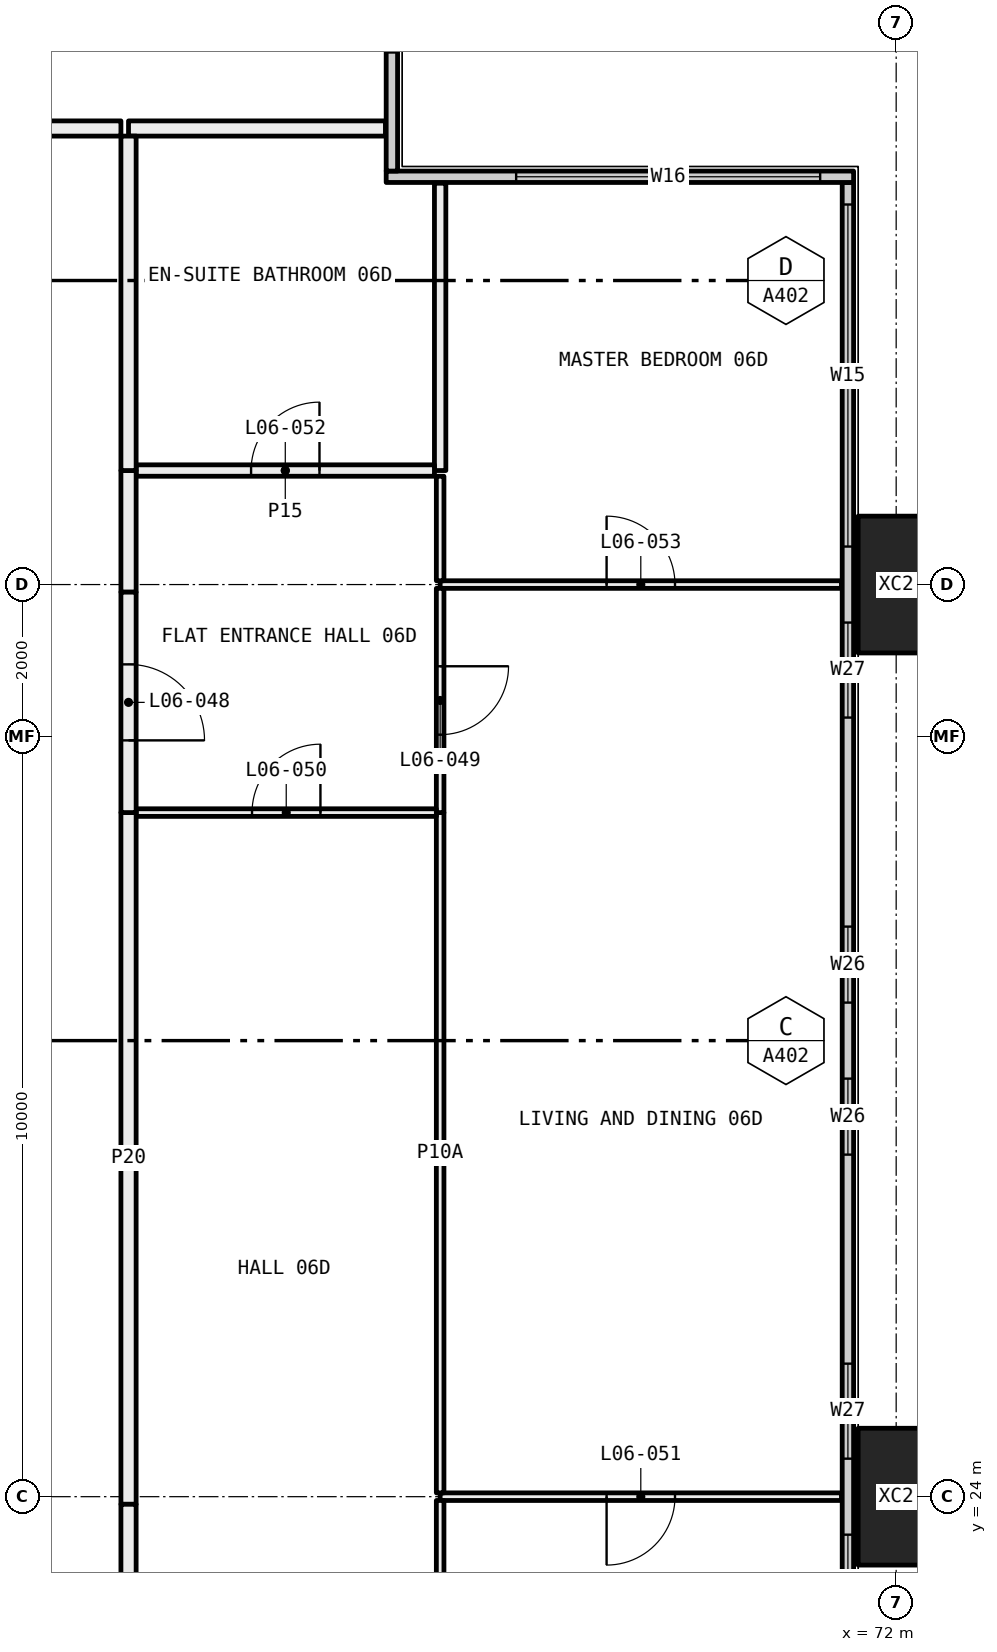
"""IFC4 building model, lengths in metres.
Left out: names, types, materials, properties, quantities, classifications, styles, units other than length and angle.
Written with IfcOpenShell. Run it as: python <this file> out.ifc"""

import sys

from ifc_helpers import new_model, si_unit, direction, frame, frame_2d, origin, origin_2d, place, context, subcontext, project, spatial, rectangle, hollow_rectangle, extrude, element, fill, save


model = new_model("IFC4")
c1 = context("Model", 3, precision=1e-05, world=origin(), true_north=direction((0.0, 1.0)))
c2 = subcontext(c1, "Body", "Model", "MODEL_VIEW")
j1 = project(units=[si_unit("LENGTHUNIT", "METRE"), si_unit("PLANEANGLEUNIT", "RADIAN")], contexts=[c1])
p1 = place(None, origin())
s1 = spatial("IfcSite", under=j1, at=p1, CompositionType="ELEMENT")
p2 = place(p1, origin())
s2 = spatial("IfcBuilding", under=s1, at=p2, CompositionType="ELEMENT")
p3 = place(p2, frame((0.0, 0.0, 33.45)))
s3 = spatial("IfcBuildingStorey", under=s2, at=p3, CompositionType="ELEMENT", Elevation=33.45)
for number, where, z_axis, x_axis in (
    (1, (72.0, 24.0, -0.4), (0.0, 0.0, 1.0), (0.0, 1.0, 0.0)),
    (2, (72.0, 36.0, -0.4), (0.0, 0.0, 1.0), (0.0, 1.0, 0.0)),
):
    element("IfcColumn", number, at=place(p3, frame(where, z_axis=z_axis, x_axis=x_axis)), inside=s3, PredefinedType="COLUMN", context=c2, shape_type="SweptSolid", body=[
        extrude(hollow_rectangle(XDim=1.8, YDim=1.0, WallThickness=0.07, at=origin_2d()), origin(), (0.0, 0.0, 1.0), 3.45),
    ])
p4 = place(p3, frame((71.365, 6.71, 0.0), z_axis=(0.0, 0.0, 1.0), x_axis=(0.0, 1.0, 0.0)))
e3 = element("IfcWall", 3, at=p4, inside=s3, PredefinedType="ELEMENTEDWALL", context=c2, shape_type="SweptSolid", body=[
    extrude(rectangle(XDim=34.58, YDim=0.15, at=frame_2d((17.29, 0.0))), origin(), (0.0, 0.0, 1.0), 3.05),
])
p5 = place(p4, frame((0.29, 0.0, 0.45)))
e4 = element("IfcOpeningElement", 4, at=p5, cuts=e3, PredefinedType="OPENING", context=c2, shape_type="SweptSolid", body=[
    extrude(rectangle(XDim=4.5, YDim=2.55, at=frame_2d((2.25, 1.275))), frame((0.0, 0.085, 0.0), z_axis=(0.0, -1.0, 0.0), x_axis=(1.0, 0.0, 0.0)), (0.0, 0.0, 1.0), 0.17),
])
p6 = place(p4, frame((5.79, 0.0, 0.45)))
e5 = element("IfcOpeningElement", 5, at=p6, cuts=e3, PredefinedType="OPENING", context=c2, shape_type="SweptSolid", body=[
    extrude(rectangle(XDim=1.25, YDim=2.55, at=frame_2d((0.625, 1.275))), frame((0.0, 0.085, 0.0), z_axis=(0.0, -1.0, 0.0), x_axis=(1.0, 0.0, 0.0)), (0.0, 0.0, 1.0), 0.17),
])
p7 = place(p4, frame((9.79, 0.0, 0.45)))
e6 = element("IfcOpeningElement", 6, at=p7, cuts=e3, PredefinedType="OPENING", context=c2, shape_type="SweptSolid", body=[
    extrude(rectangle(XDim=1.0, YDim=2.55, at=frame_2d((0.5, 1.275))), frame((0.0, 0.085, 0.0), z_axis=(0.0, -1.0, 0.0), x_axis=(1.0, 0.0, 0.0)), (0.0, 0.0, 1.0), 0.17),
])
p8 = place(p4, frame((11.79, 0.0, 0.45)))
e7 = element("IfcOpeningElement", 7, at=p8, cuts=e3, PredefinedType="OPENING", context=c2, shape_type="SweptSolid", body=[
    extrude(rectangle(XDim=1.0, YDim=2.55, at=frame_2d((0.5, 1.275))), frame((0.0, 0.085, 0.0), z_axis=(0.0, -1.0, 0.0), x_axis=(1.0, 0.0, 0.0)), (0.0, 0.0, 1.0), 0.17),
])
p9 = place(p4, frame((15.54, 0.0, 0.45)))
e8 = element("IfcOpeningElement", 8, at=p9, cuts=e3, PredefinedType="OPENING", context=c2, shape_type="SweptSolid", body=[
    extrude(rectangle(XDim=1.25, YDim=2.55, at=frame_2d((0.625, 1.275))), frame((0.0, 0.085, 0.0), z_axis=(0.0, -1.0, 0.0), x_axis=(1.0, 0.0, 0.0)), (0.0, 0.0, 1.0), 0.17),
])
p10 = place(p4, frame((17.79, 0.0, 0.45)))
e9 = element("IfcOpeningElement", 9, at=p10, cuts=e3, PredefinedType="OPENING", context=c2, shape_type="SweptSolid", body=[
    extrude(rectangle(XDim=1.25, YDim=2.55, at=frame_2d((0.625, 1.275))), frame((0.0, 0.085, 0.0), z_axis=(0.0, -1.0, 0.0), x_axis=(1.0, 0.0, 0.0)), (0.0, 0.0, 1.0), 0.17),
])
p11 = place(p4, frame((21.79, 0.0, 0.45)))
e10 = element("IfcOpeningElement", 10, at=p11, cuts=e3, PredefinedType="OPENING", context=c2, shape_type="SweptSolid", body=[
    extrude(rectangle(XDim=1.0, YDim=2.55, at=frame_2d((0.5, 1.275))), frame((0.0, 0.085, 0.0), z_axis=(0.0, -1.0, 0.0), x_axis=(1.0, 0.0, 0.0)), (0.0, 0.0, 1.0), 0.17),
])
p12 = place(p4, frame((23.79, 0.0, 0.45)))
e11 = element("IfcOpeningElement", 11, at=p12, cuts=e3, PredefinedType="OPENING", context=c2, shape_type="SweptSolid", body=[
    extrude(rectangle(XDim=1.0, YDim=2.55, at=frame_2d((0.5, 1.275))), frame((0.0, 0.085, 0.0), z_axis=(0.0, -1.0, 0.0), x_axis=(1.0, 0.0, 0.0)), (0.0, 0.0, 1.0), 0.17),
])
p13 = place(p4, frame((27.54, 0.0, 0.45)))
e12 = element("IfcOpeningElement", 12, at=p13, cuts=e3, PredefinedType="OPENING", context=c2, shape_type="SweptSolid", body=[
    extrude(rectangle(XDim=1.25, YDim=2.55, at=frame_2d((0.625, 1.275))), frame((0.0, 0.085, 0.0), z_axis=(0.0, -1.0, 0.0), x_axis=(1.0, 0.0, 0.0)), (0.0, 0.0, 1.0), 0.17),
])
p14 = place(p4, frame((29.79, 0.0, 0.45)))
e13 = element("IfcOpeningElement", 13, at=p14, cuts=e3, PredefinedType="OPENING", context=c2, shape_type="SweptSolid", body=[
    extrude(rectangle(XDim=4.5, YDim=2.55, at=frame_2d((2.25, 1.275))), frame((0.0, 0.085, 0.0), z_axis=(0.0, -1.0, 0.0), x_axis=(1.0, 0.0, 0.0)), (0.0, 0.0, 1.0), 0.17),
])
p15 = place(p3, frame((65.29, 41.365, 0.0), z_axis=(0.0, 0.0, 1.0), x_axis=(1.0, 0.0, 0.0)))
e14 = element("IfcWall", 14, at=p15, inside=s3, PredefinedType="ELEMENTEDWALL", context=c2, shape_type="SweptSolid", body=[
    extrude(rectangle(XDim=6.15, YDim=0.15, at=frame_2d((3.075, 0.0))), origin(), (0.0, 0.0, 1.0), 3.05),
])
p16 = place(p15, frame((1.71, 0.0, 0.45)))
e15 = element("IfcOpeningElement", 15, at=p16, cuts=e14, PredefinedType="OPENING", context=c2, shape_type="SweptSolid", body=[
    extrude(rectangle(XDim=4.0, YDim=2.55, at=frame_2d((2.0, 1.275))), frame((0.0, 0.085, 0.0), z_axis=(0.0, -1.0, 0.0), x_axis=(1.0, 0.0, 0.0)), (0.0, 0.0, 1.0), 0.17),
])
p17 = place(p3, frame((65.365, 41.44, 0.0), z_axis=(0.0, 0.0, 1.0), x_axis=(0.0, 1.0, 0.0)))
e16 = element("IfcWall", 16, at=p17, inside=s3, PredefinedType="ELEMENTEDWALL", context=c2, shape_type="SweptSolid", body=[
    extrude(rectangle(XDim=5.85, YDim=0.15, at=frame_2d((2.925, 0.0))), origin(), (0.0, 0.0, 1.0), 3.05),
])
p18 = place(p17, frame((1.56, 0.0, 0.45)))
e17 = element("IfcOpeningElement", 17, at=p18, cuts=e16, PredefinedType="OPENING", context=c2, shape_type="SweptSolid", body=[
    extrude(rectangle(XDim=4.0, YDim=2.55, at=frame_2d((2.0, 1.275))), frame((0.0, 0.085, 0.0), z_axis=(0.0, -1.0, 0.0), x_axis=(1.0, 0.0, 0.0)), (0.0, 0.0, 1.0), 0.17),
])
p19 = place(p3, frame((71.28, 24.0, 0.0), z_axis=(0.0, 0.0, 1.0), x_axis=(-1.0, 0.0, 0.0)))
e18 = element("IfcWall", 18, at=p19, inside=s3, PredefinedType="PARTITIONING", context=c2, shape_type="SweptSolid", body=[
    extrude(rectangle(XDim=5.28, YDim=0.1, at=frame_2d((2.64, 0.0))), origin(), (0.0, 0.0, 1.0), 2.45),
])
p20 = place(p19, frame((2.19, 0.0, 0.0)))
e19 = element("IfcOpeningElement", 19, at=p20, cuts=e18, PredefinedType="OPENING", context=c2, shape_type="SweptSolid", body=[
    extrude(rectangle(XDim=0.9, YDim=2.1, at=frame_2d((0.45, 1.05))), frame((0.0, 0.06, 0.0), z_axis=(0.0, -1.0, 0.0), x_axis=(1.0, 0.0, 0.0)), (0.0, 0.0, 1.0), 0.12),
])
p21 = place(p3, frame((66.0, 23.95, 0.0), z_axis=(0.0, 0.0, 1.0), x_axis=(0.0, -1.0, 0.0)))
e20 = element("IfcWall", 20, at=p21, inside=s3, PredefinedType="PARTITIONING", context=c2, shape_type="SweptSolid", body=[
    extrude(rectangle(XDim=2.875, YDim=0.1, at=frame_2d((1.438, 0.0))), origin(), (0.0, 0.0, 1.0), 2.45),
])
p22 = place(p3, frame((71.28, 36.0, 0.0), z_axis=(0.0, 0.0, 1.0), x_axis=(-1.0, 0.0, 0.0)))
e21 = element("IfcWall", 21, at=p22, inside=s3, PredefinedType="PARTITIONING", context=c2, shape_type="SweptSolid", body=[
    extrude(rectangle(XDim=5.28, YDim=0.1, at=frame_2d((2.64, 0.0))), origin(), (0.0, 0.0, 1.0), 2.45),
])
p23 = place(p22, frame((2.19, 0.0, 0.0)))
e22 = element("IfcOpeningElement", 22, at=p23, cuts=e21, PredefinedType="OPENING", context=c2, shape_type="SweptSolid", body=[
    extrude(rectangle(XDim=0.9, YDim=2.1, at=frame_2d((0.45, 1.05))), frame((0.0, 0.06, 0.0), z_axis=(0.0, -1.0, 0.0), x_axis=(1.0, 0.0, 0.0)), (0.0, 0.0, 1.0), 0.12),
])
p24 = place(p3, frame((66.0, 33.0, 0.0), z_axis=(0.0, 0.0, 1.0), x_axis=(0.0, -1.0, 0.0)))
e23 = element("IfcWall", 23, at=p24, inside=s3, PredefinedType="PARTITIONING", context=c2, shape_type="SweptSolid", body=[
    extrude(rectangle(XDim=8.95, YDim=0.1, at=frame_2d((4.475, 0.0))), origin(), (0.0, 0.0, 1.0), 2.45),
])
p25 = place(p3, frame((66.0, 35.95, 0.0), z_axis=(0.0, 0.0, 1.0), x_axis=(0.0, -1.0, 0.0)))
e24 = element("IfcWall", 24, at=p25, inside=s3, PredefinedType="PARTITIONING", context=c2, shape_type="SweptSolid", body=[
    extrude(rectangle(XDim=2.95, YDim=0.1, at=frame_2d((1.475, 0.0))), origin(), (0.0, 0.0, 1.0), 2.45),
])
p26 = place(p25, frame((1.025, 0.0, 0.0)))
e25 = element("IfcOpeningElement", 25, at=p26, cuts=e24, PredefinedType="OPENING", context=c2, shape_type="SweptSolid", body=[
    extrude(rectangle(XDim=0.9, YDim=2.1, at=frame_2d((0.45, 1.05))), frame((0.0, 0.06, 0.0), z_axis=(0.0, -1.0, 0.0), x_axis=(1.0, 0.0, 0.0)), (0.0, 0.0, 1.0), 0.12),
])
p27 = place(p3, frame((66.0, 37.425, 0.0), z_axis=(0.0, 0.0, 1.0), x_axis=(0.0, -1.0, 0.0)))
e26 = element("IfcWall", 26, at=p27, inside=s3, PredefinedType="PARTITIONING", context=c2, shape_type="SweptSolid", body=[
    extrude(rectangle(XDim=1.375, YDim=0.1, at=frame_2d((0.688, 0.0))), origin(), (0.0, 0.0, 1.0), 2.45),
])
p28 = place(p3, frame((66.0, 41.28, 0.0), z_axis=(0.0, 0.0, 1.0), x_axis=(0.0, -1.0, 0.0)))
e27 = element("IfcWall", 27, at=p28, inside=s3, PredefinedType="PARTITIONING", context=c2, shape_type="SweptSolid", body=[
    extrude(rectangle(XDim=3.78, YDim=0.15, at=frame_2d((1.89, 0.0))), origin(), (0.0, 0.0, 1.0), 3.05),
])
p29 = place(p3, frame((65.95, 33.0, 0.0), z_axis=(0.0, 0.0, 1.0), x_axis=(-1.0, 0.0, 0.0)))
e28 = element("IfcWall", 28, at=p29, inside=s3, PredefinedType="PARTITIONING", context=c2, shape_type="SweptSolid", body=[
    extrude(rectangle(XDim=3.95, YDim=0.1, at=frame_2d((1.975, 0.0))), origin(), (0.0, 0.0, 1.0), 3.05),
])
p30 = place(p29, frame((1.525, 0.0, 0.0)))
e29 = element("IfcOpeningElement", 29, at=p30, cuts=e28, PredefinedType="OPENING", context=c2, shape_type="SweptSolid", body=[
    extrude(rectangle(XDim=0.9, YDim=2.1, at=frame_2d((0.45, 1.05))), frame((0.0, 0.06, 0.0), z_axis=(0.0, -1.0, 0.0), x_axis=(1.0, 0.0, 0.0)), (0.0, 0.0, 1.0), 0.12),
])
p31 = place(p3, frame((61.9, 33.0, 0.0), z_axis=(0.0, 0.0, 1.0), x_axis=(0.0, -1.0, 0.0)))
e30 = element("IfcWall", 30, at=p31, inside=s3, PredefinedType="PARTITIONING", context=c2, shape_type="SweptSolid", body=[
    extrude(rectangle(XDim=9.1, YDim=0.2, at=frame_2d((4.55, 0.0))), origin(), (0.0, 0.0, 1.0), 2.45),
])
p32 = place(p3, frame((61.9, 23.9, 0.0), z_axis=(0.0, 0.0, 1.0), x_axis=(0.0, -1.0, 0.0)))
e31 = element("IfcWall", 31, at=p32, inside=s3, PredefinedType="PARTITIONING", context=c2, shape_type="SweptSolid", body=[
    extrude(rectangle(XDim=2.9, YDim=0.2, at=frame_2d((1.45, 0.0))), origin(), (0.0, 0.0, 1.0), 3.05),
])
p33 = place(p3, frame((65.925, 37.5, 0.0), z_axis=(0.0, 0.0, 1.0), x_axis=(-1.0, 0.0, 0.0)))
e32 = element("IfcWall", 32, at=p33, inside=s3, PredefinedType="PARTITIONING", context=c2, shape_type="SweptSolid", body=[
    extrude(rectangle(XDim=3.925, YDim=0.15, at=frame_2d((1.962, 0.0))), origin(), (0.0, 0.0, 1.0), 3.05),
])
p34 = place(p33, frame((1.512, 0.0, 0.0)))
e33 = element("IfcOpeningElement", 33, at=p34, cuts=e32, PredefinedType="OPENING", context=c2, shape_type="SweptSolid", body=[
    extrude(rectangle(XDim=0.9, YDim=2.1, at=frame_2d((0.45, 1.05))), frame((0.0, 0.085, 0.0), z_axis=(0.0, -1.0, 0.0), x_axis=(1.0, 0.0, 0.0)), (0.0, 0.0, 1.0), 0.17),
])
p35 = place(p3, frame((61.9, 37.5, 0.0), z_axis=(0.0, 0.0, 1.0), x_axis=(0.0, -1.0, 0.0)))
e34 = element("IfcWall", 34, at=p35, inside=s3, PredefinedType="PARTITIONING", context=c2, shape_type="SweptSolid", body=[
    extrude(rectangle(XDim=1.6, YDim=0.2, at=frame_2d((0.8, 0.0))), origin(), (0.0, 0.0, 1.0), 2.45),
])
p36 = place(p3, frame((61.9, 35.9, 0.0), z_axis=(0.0, 0.0, 1.0), x_axis=(0.0, -1.0, 0.0)))
e35 = element("IfcWall", 35, at=p36, inside=s3, PredefinedType="PARTITIONING", context=c2, shape_type="SweptSolid", body=[
    extrude(rectangle(XDim=2.9, YDim=0.2, at=frame_2d((1.45, 0.0))), origin(), (0.0, 0.0, 1.0), 3.05),
])
p37 = place(p36, frame((0.95, 0.0, 0.0)))
e36 = element("IfcOpeningElement", 36, at=p37, cuts=e35, PredefinedType="OPENING", context=c2, shape_type="SweptSolid", body=[
    extrude(rectangle(XDim=1.0, YDim=2.1, at=frame_2d((0.5, 1.05))), frame((0.0, 0.11, 0.0), z_axis=(0.0, -1.0, 0.0), x_axis=(1.0, 0.0, 0.0)), (0.0, 0.0, 1.0), 0.22),
])
p38 = place(p3, frame((65.28, 42.0, 0.0), z_axis=(0.0, 0.0, 1.0), x_axis=(-1.0, 0.0, 0.0)))
e37 = element("IfcWall", 37, at=p38, inside=s3, PredefinedType="PARTITIONING", context=c2, shape_type="SweptSolid", body=[
    extrude(rectangle(XDim=3.38, YDim=0.2, at=frame_2d((1.69, 0.0))), origin(), (0.0, 0.0, 1.0), 3.05),
])
p39 = place(p3, frame((61.9, 41.9, 0.0), z_axis=(0.0, 0.0, 1.0), x_axis=(0.0, -1.0, 0.0)))
e38 = element("IfcWall", 38, at=p39, inside=s3, PredefinedType="PARTITIONING", context=c2, shape_type="SweptSolid", body=[
    extrude(rectangle(XDim=4.4, YDim=0.2, at=frame_2d((2.2, 0.0))), origin(), (0.0, 0.0, 1.0), 3.05),
])
p40 = place(p3, frame((60.0, 42.0, 0.0), z_axis=(0.0, 0.0, 1.0), x_axis=(1.0, 0.0, 0.0)))
e39 = element("IfcWall", 39, at=p40, inside=s3, PredefinedType="PARTITIONING", context=c2, shape_type="SweptSolid", body=[
    extrude(rectangle(XDim=1.8, YDim=0.2, at=frame_2d((0.9, 0.0))), origin(), (0.0, 0.0, 1.0), 3.05),
])
p41 = place(p9, origin())
e40 = element("IfcWindow", 40, at=p41, inside=s3, PartitioningType="SINGLE_PANEL", PredefinedType="WINDOW", context=c2, shape_type="SweptSolid", body=[
    extrude(rectangle(XDim=1.25, YDim=2.55, at=frame_2d((0.625, 1.275))), frame((0.0, 0.03, 0.0), z_axis=(0.0, -1.0, 0.0), x_axis=(1.0, 0.0, 0.0)), (0.0, 0.0, 1.0), 0.06),
])
fill(e8, e40)
p42 = place(p10, origin())
e41 = element("IfcWindow", 41, at=p42, inside=s3, PartitioningType="SINGLE_PANEL", PredefinedType="WINDOW", context=c2, shape_type="SweptSolid", body=[
    extrude(rectangle(XDim=1.25, YDim=2.55, at=frame_2d((0.625, 1.275))), frame((0.0, 0.03, 0.0), z_axis=(0.0, -1.0, 0.0), x_axis=(1.0, 0.0, 0.0)), (0.0, 0.0, 1.0), 0.06),
])
fill(e9, e41)
p43 = place(p11, origin())
e42 = element("IfcWindow", 42, at=p43, inside=s3, PartitioningType="SINGLE_PANEL", PredefinedType="WINDOW", context=c2, shape_type="SweptSolid", body=[
    extrude(rectangle(XDim=1.0, YDim=2.55, at=frame_2d((0.5, 1.275))), frame((0.0, 0.03, 0.0), z_axis=(0.0, -1.0, 0.0), x_axis=(1.0, 0.0, 0.0)), (0.0, 0.0, 1.0), 0.06),
])
fill(e10, e42)
p44 = place(p12, origin())
e43 = element("IfcWindow", 43, at=p44, inside=s3, PartitioningType="SINGLE_PANEL", PredefinedType="WINDOW", context=c2, shape_type="SweptSolid", body=[
    extrude(rectangle(XDim=1.0, YDim=2.55, at=frame_2d((0.5, 1.275))), frame((0.0, 0.03, 0.0), z_axis=(0.0, -1.0, 0.0), x_axis=(1.0, 0.0, 0.0)), (0.0, 0.0, 1.0), 0.06),
])
fill(e11, e43)
p45 = place(p13, origin())
e44 = element("IfcWindow", 44, at=p45, inside=s3, PartitioningType="SINGLE_PANEL", PredefinedType="WINDOW", context=c2, shape_type="SweptSolid", body=[
    extrude(rectangle(XDim=1.25, YDim=2.55, at=frame_2d((0.625, 1.275))), frame((0.0, 0.03, 0.0), z_axis=(0.0, -1.0, 0.0), x_axis=(1.0, 0.0, 0.0)), (0.0, 0.0, 1.0), 0.06),
])
fill(e12, e44)
p46 = place(p14, origin())
e45 = element("IfcWindow", 45, at=p46, inside=s3, PartitioningType="SINGLE_PANEL", PredefinedType="WINDOW", context=c2, shape_type="SweptSolid", body=[
    extrude(rectangle(XDim=4.5, YDim=2.55, at=frame_2d((2.25, 1.275))), frame((0.0, 0.03, 0.0), z_axis=(0.0, -1.0, 0.0), x_axis=(1.0, 0.0, 0.0)), (0.0, 0.0, 1.0), 0.06),
])
fill(e13, e45)
p47 = place(p16, origin())
e46 = element("IfcWindow", 46, at=p47, inside=s3, PartitioningType="SINGLE_PANEL", PredefinedType="WINDOW", context=c2, shape_type="SweptSolid", body=[
    extrude(rectangle(XDim=4.0, YDim=2.55, at=frame_2d((2.0, 1.275))), frame((0.0, 0.03, 0.0), z_axis=(0.0, -1.0, 0.0), x_axis=(1.0, 0.0, 0.0)), (0.0, 0.0, 1.0), 0.06),
])
fill(e15, e46)
p48 = place(p37, origin())
e47 = element("IfcDoor", 47, at=p48, inside=s3, OperationType="SINGLE_SWING_LEFT", PredefinedType="DOOR", context=c2, shape_type="SweptSolid", body=[
    extrude(rectangle(XDim=1.0, YDim=2.1, at=frame_2d((0.5, 1.05))), frame((0.0, 0.025, 0.0), z_axis=(0.0, -1.0, 0.0), x_axis=(1.0, 0.0, 0.0)), (0.0, 0.0, 1.0), 0.05),
])
fill(e36, e47)
p49 = place(p26, origin())
e48 = element("IfcDoor", 48, at=p49, inside=s3, OperationType="SINGLE_SWING_RIGHT", PredefinedType="DOOR", context=c2, shape_type="SweptSolid", body=[
    extrude(rectangle(XDim=0.9, YDim=2.1, at=frame_2d((0.45, 1.05))), frame((0.0, 0.025, 0.0), z_axis=(0.0, -1.0, 0.0), x_axis=(1.0, 0.0, 0.0)), (0.0, 0.0, 1.0), 0.05),
])
fill(e25, e48)
p50 = place(p30, frame((0.9, 0.0, 0.0), x_axis=(-1.0, 0.0, 0.0)))
e49 = element("IfcDoor", 49, at=p50, inside=s3, OperationType="SINGLE_SWING_LEFT", PredefinedType="DOOR", context=c2, shape_type="SweptSolid", body=[
    extrude(rectangle(XDim=0.9, YDim=2.1, at=frame_2d((0.45, 1.05))), frame((0.0, 0.025, 0.0), z_axis=(0.0, -1.0, 0.0), x_axis=(1.0, 0.0, 0.0)), (0.0, 0.0, 1.0), 0.05),
])
fill(e29, e49)
p51 = place(p20, origin())
e50 = element("IfcDoor", 50, at=p51, inside=s3, OperationType="SINGLE_SWING_LEFT", PredefinedType="DOOR", context=c2, shape_type="SweptSolid", body=[
    extrude(rectangle(XDim=0.9, YDim=2.1, at=frame_2d((0.45, 1.05))), frame((0.0, 0.025, 0.0), z_axis=(0.0, -1.0, 0.0), x_axis=(1.0, 0.0, 0.0)), (0.0, 0.0, 1.0), 0.05),
])
fill(e19, e50)
p52 = place(p34, frame((0.9, 0.0, 0.0), x_axis=(-1.0, 0.0, 0.0)))
e51 = element("IfcDoor", 51, at=p52, inside=s3, OperationType="SINGLE_SWING_LEFT", PredefinedType="DOOR", context=c2, shape_type="SweptSolid", body=[
    extrude(rectangle(XDim=0.9, YDim=2.1, at=frame_2d((0.45, 1.05))), frame((0.0, 0.025, 0.0), z_axis=(0.0, -1.0, 0.0), x_axis=(1.0, 0.0, 0.0)), (0.0, 0.0, 1.0), 0.05),
])
fill(e33, e51)
p53 = place(p23, frame((0.9, 0.0, 0.0), x_axis=(-1.0, 0.0, 0.0)))
e52 = element("IfcDoor", 52, at=p53, inside=s3, OperationType="SINGLE_SWING_RIGHT", PredefinedType="DOOR", context=c2, shape_type="SweptSolid", body=[
    extrude(rectangle(XDim=0.9, YDim=2.1, at=frame_2d((0.45, 1.05))), frame((0.0, 0.025, 0.0), z_axis=(0.0, -1.0, 0.0), x_axis=(1.0, 0.0, 0.0)), (0.0, 0.0, 1.0), 0.05),
])
fill(e22, e52)
save(model, sys.argv[1])
